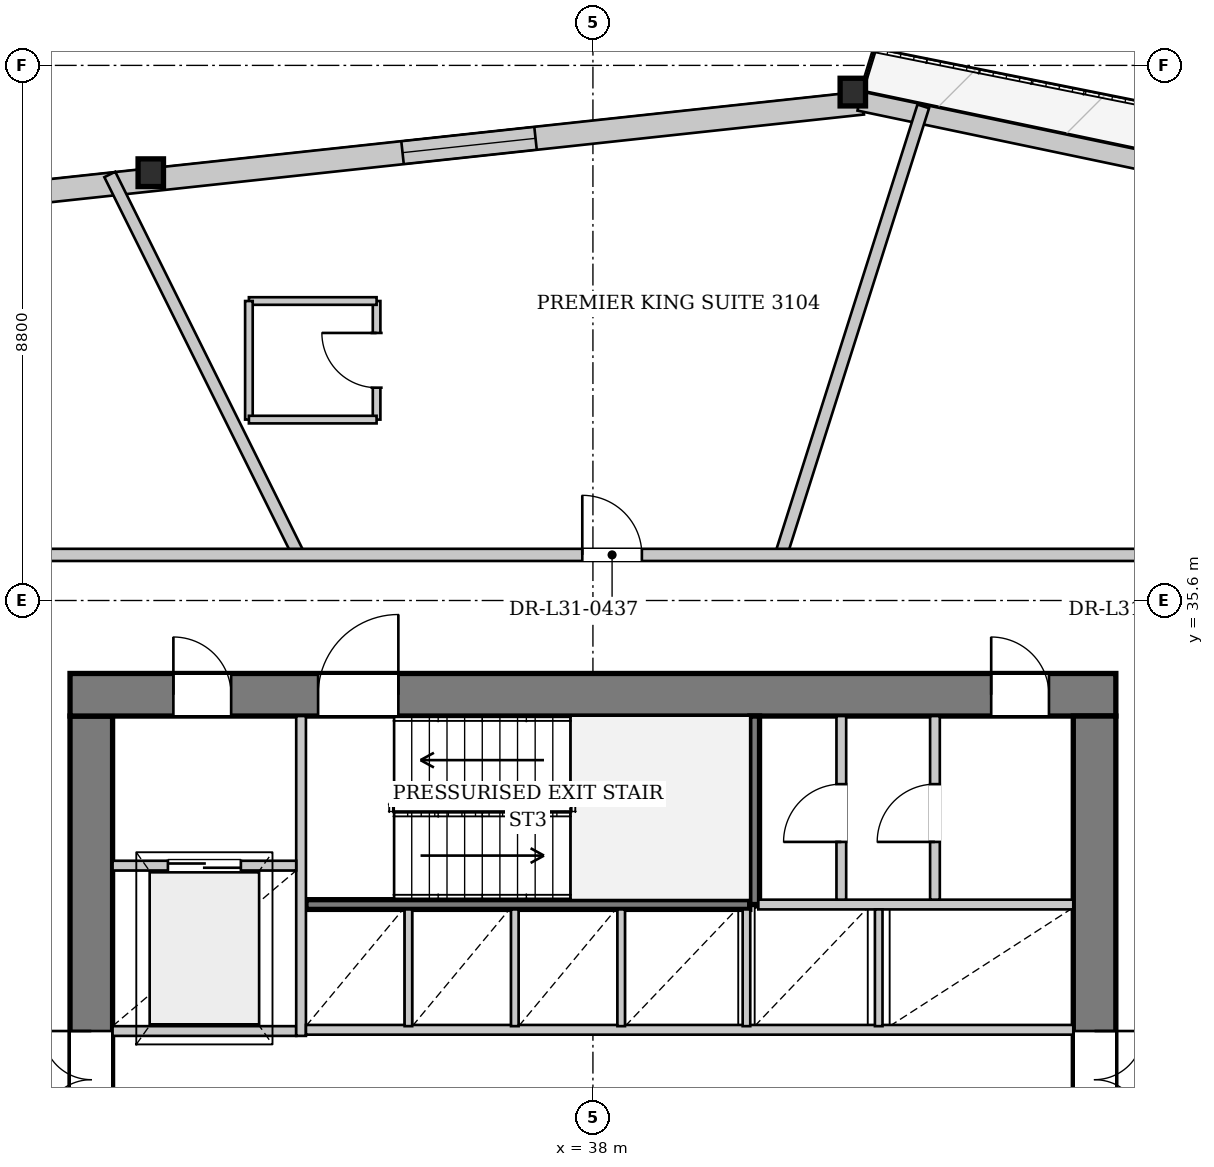
"""IFC4 building model, lengths in metres.
Left out: names, types, materials, properties, quantities, classifications, styles, units other than length and angle.
Written with IfcOpenShell. Run it as: python <this file> out.ifc"""

import sys

from ifc_helpers import new_model, si_unit, direction, frame, frame_2d, origin, origin_2d, place, context, subcontext, project, spatial, rectangle, i_section, extrude, source, transform, mapped, element, fill, save


model = new_model("IFC4")
c1 = context("Model", 3, precision=1e-05, world=origin(), true_north=direction((0.0, 1.0)))
c2 = subcontext(c1, "Body", "Model", "MODEL_VIEW")
j1 = project(units=[si_unit("LENGTHUNIT", "METRE"), si_unit("PLANEANGLEUNIT", "RADIAN")], contexts=[c1])
p1 = place(None, origin())
s1 = spatial("IfcSite", under=j1, at=p1, CompositionType="ELEMENT")
p2 = place(p1, origin())
s2 = spatial("IfcBuilding", under=s1, at=p2, CompositionType="ELEMENT")
p3 = place(p2, frame((0.0, 0.0, 119.9)))
s3 = spatial("IfcBuildingStorey", under=s2, at=p3, CompositionType="ELEMENT", Elevation=119.9)
m1 = source(origin(), c2, "Body", "SweptSolid", [
    extrude(i_section(OverallWidth=0.418, OverallDepth=0.455, WebThickness=0.038, FlangeThickness=0.059, at=origin_2d()), origin(), (0.0, 0.0, 1.0), 3.397),
])
p4 = place(p3, frame((42.417, 43.97, 0.0), z_axis=(-0.08401367615, -0.00546196697, 0.996449632012), x_axis=(0.064875871655, -0.997893341634, 0.0)))
e1 = element("IfcColumn", 1, at=p4, inside=s3, PredefinedType="COLUMN", context=c2, shape_type="MappedRepresentation", body=[
    mapped(m1, transform((0.0, 0.0, 0.0), x_axis=(1.0, 0.0, 0.0), y_axis=(0.0, 1.0, 0.0), z_axis=(0.0, 0.0, 1.0), scale=1.0)),
])
m2 = source(origin(), c2, "Body", "SweptSolid", [
    extrude(i_section(OverallWidth=0.418, OverallDepth=0.455, WebThickness=0.038, FlangeThickness=0.059, at=origin_2d()), origin(), (0.0, 0.0, 1.0), 3.399),
])
p5 = place(p3, frame((30.854, 42.723, 0.0), z_axis=(-0.074056478472, -0.051573764833, 0.995919567424), x_axis=(0.571484182627, -0.820613081182, 0.0)))
e2 = element("IfcColumn", 2, at=p5, inside=s3, PredefinedType="COLUMN", context=c2, shape_type="MappedRepresentation", body=[
    mapped(m2, transform((0.0, 0.0, 0.0), x_axis=(1.0, 0.0, 0.0), y_axis=(0.0, 1.0, 0.0), z_axis=(0.0, 0.0, 1.0), scale=1.0)),
])
p6 = place(p3, frame((19.312, 41.287, 0.0), z_axis=(0.0, 0.0, 1.0), x_axis=(0.994233058372, 0.107240969969, 0.0)))
e3 = element("IfcWall", 3, at=p6, inside=s3, PredefinedType="SOLIDWALL", context=c2, shape_type="SweptSolid", body=[
    extrude(rectangle(XDim=23.26, YDim=0.38, at=frame_2d((11.63, 0.0))), origin(), (0.0, 0.0, 1.0), 2.692),
])
p7 = place(p6, frame((5.413, 0.0, 0.322)))
e4 = element("IfcOpeningElement", 4, at=p7, cuts=e3, PredefinedType="OPENING", context=c2, shape_type="SweptSolid", body=[
    extrude(rectangle(XDim=2.2, YDim=2.25, at=frame_2d((1.1, 1.125))), frame((0.0, 0.2, 0.0), z_axis=(0.0, -1.0, 0.0), x_axis=(1.0, 0.0, 0.0)), (0.0, 0.0, 1.0), 0.4),
])
p8 = place(p6, frame((15.647, 0.0, 0.322)))
e5 = element("IfcOpeningElement", 5, at=p8, cuts=e3, PredefinedType="OPENING", context=c2, shape_type="SweptSolid", body=[
    extrude(rectangle(XDim=2.2, YDim=2.25, at=frame_2d((1.1, 1.125))), frame((0.0, 0.2, 0.0), z_axis=(0.0, -1.0, 0.0), x_axis=(1.0, 0.0, 0.0)), (0.0, 0.0, 1.0), 0.4),
])
p9 = place(p3, frame((42.384, 43.813, 0.0), z_axis=(0.0, 0.0, 1.0), x_axis=(0.978690657653, -0.205340197291, 0.0)))
e6 = element("IfcWall", 6, at=p9, inside=s3, PredefinedType="SOLIDWALL", context=c2, shape_type="SweptSolid", body=[
    extrude(rectangle(XDim=23.26, YDim=0.32, at=frame_2d((11.63, 0.0))), origin(), (0.0, 0.0, 1.0), 2.692),
])
p10 = place(p9, frame((6.893, 0.0, 0.0)))
e7 = element("IfcOpeningElement", 7, at=p10, cuts=e6, PredefinedType="OPENING", context=c2, shape_type="SweptSolid", body=[
    extrude(rectangle(XDim=1.1, YDim=2.3, at=frame_2d((0.55, 1.15))), frame((0.0, 0.17, 0.0), z_axis=(0.0, -1.0, 0.0), x_axis=(1.0, 0.0, 0.0)), (0.0, 0.0, 1.0), 0.34),
])
p11 = place(p9, frame((16.312, 0.0, 0.372)))
e8 = element("IfcOpeningElement", 8, at=p11, cuts=e6, PredefinedType="OPENING", context=c2, shape_type="SweptSolid", body=[
    extrude(rectangle(XDim=1.8, YDim=2.2, at=frame_2d((0.9, 1.1))), frame((0.0, 0.17, 0.0), z_axis=(0.0, -1.0, 0.0), x_axis=(1.0, 0.0, 0.0)), (0.0, 0.0, 1.0), 0.34),
])
p12 = place(p3, frame((29.75, 19.5, 0.0), z_axis=(0.0, 0.0, 1.0), x_axis=(0.0, 1.0, 0.0)))
e9 = element("IfcWall", 9, at=p12, inside=s3, PredefinedType="SHEAR", context=c2, shape_type="SweptSolid", body=[
    extrude(rectangle(XDim=14.2, YDim=0.7, at=frame_2d((7.1, 0.0))), origin(), (0.0, 0.0, 1.0), 3.3),
])
p13 = place(p12, frame((7.42, 0.0, 0.0)))
e10 = element("IfcOpeningElement", 10, at=p13, cuts=e9, PredefinedType="OPENING", context=c2, shape_type="SweptSolid", body=[
    extrude(rectangle(XDim=1.6, YDim=2.2, at=frame_2d((0.8, 1.1))), frame((0.0, 0.36, 0.0), z_axis=(0.0, -1.0, 0.0), x_axis=(1.0, 0.0, 0.0)), (0.0, 0.0, 1.0), 0.72),
])
p14 = place(p3, frame((29.4, 34.05, 0.0), z_axis=(0.0, 0.0, 1.0), x_axis=(1.0, 0.0, 0.0)))
e11 = element("IfcWall", 11, at=p14, inside=s3, PredefinedType="SHEAR", context=c2, shape_type="SweptSolid", body=[
    extrude(rectangle(XDim=17.2, YDim=0.7, at=frame_2d((8.6, 0.0))), origin(), (0.0, 0.0, 1.0), 3.3),
])
p15 = place(p14, frame((1.7, 0.0, 0.0)))
e12 = element("IfcOpeningElement", 12, at=p15, cuts=e11, PredefinedType="OPENING", context=c2, shape_type="SweptSolid", body=[
    extrude(rectangle(XDim=0.95, YDim=2.1, at=frame_2d((0.475, 1.05))), frame((0.0, 0.36, 0.0), z_axis=(0.0, -1.0, 0.0), x_axis=(1.0, 0.0, 0.0)), (0.0, 0.0, 1.0), 0.72),
])
p16 = place(p14, frame((4.08, 0.0, 0.0)))
e13 = element("IfcOpeningElement", 13, at=p16, cuts=e11, PredefinedType="OPENING", context=c2, shape_type="SweptSolid", body=[
    extrude(rectangle(XDim=1.32, YDim=2.2, at=frame_2d((0.66, 1.1))), frame((0.0, 0.36, 0.0), z_axis=(0.0, -1.0, 0.0), x_axis=(1.0, 0.0, 0.0)), (0.0, 0.0, 1.0), 0.72),
])
p17 = place(p14, frame((15.15, 0.0, 0.0)))
e14 = element("IfcOpeningElement", 14, at=p17, cuts=e11, PredefinedType="OPENING", context=c2, shape_type="SweptSolid", body=[
    extrude(rectangle(XDim=0.95, YDim=2.1, at=frame_2d((0.475, 1.05))), frame((0.0, 0.36, 0.0), z_axis=(0.0, -1.0, 0.0), x_axis=(1.0, 0.0, 0.0)), (0.0, 0.0, 1.0), 0.72),
])
p18 = place(p3, frame((46.25, 33.7, 0.0), z_axis=(0.0, 0.0, 1.0), x_axis=(0.0, -1.0, 0.0)))
e15 = element("IfcWall", 15, at=p18, inside=s3, PredefinedType="SHEAR", context=c2, shape_type="SweptSolid", body=[
    extrude(rectangle(XDim=14.2, YDim=0.7, at=frame_2d((7.1, 0.0))), origin(), (0.0, 0.0, 1.0), 3.3),
])
p19 = place(p18, frame((5.18, 0.0, 0.0)))
e16 = element("IfcOpeningElement", 16, at=p19, cuts=e15, PredefinedType="OPENING", context=c2, shape_type="SweptSolid", body=[
    extrude(rectangle(XDim=1.6, YDim=2.2, at=frame_2d((0.8, 1.1))), frame((0.0, 0.36, 0.0), z_axis=(0.0, -1.0, 0.0), x_axis=(1.0, 0.0, 0.0)), (0.0, 0.0, 1.0), 0.72),
])
p20 = place(p3, frame((33.28, 30.6, 0.0), z_axis=(0.0, 0.0, 1.0), x_axis=(1.0, 0.0, 0.0)))
e17 = element("IfcWall", 17, at=p20, inside=s3, PredefinedType="PARTITIONING", context=c2, shape_type="SweptSolid", body=[
    extrude(rectangle(XDim=7.3, YDim=0.16, at=frame_2d((3.65, 0.0))), origin(), (0.0, 0.0, 1.0), 3.3),
])
p21 = place(p3, frame((40.66, 30.6, 0.0), z_axis=(0.0, 0.0, 1.0), x_axis=(0.0, 1.0, 0.0)))
e18 = element("IfcWall", 18, at=p21, inside=s3, PredefinedType="PARTITIONING", context=c2, shape_type="SweptSolid", body=[
    extrude(rectangle(XDim=3.1, YDim=0.16, at=frame_2d((1.55, 0.0))), origin(), (0.0, 0.0, 1.0), 3.3),
])
p22 = place(p3, frame((30.1, 28.52, 0.0), z_axis=(0.0, 0.0, 1.0), x_axis=(1.0, 0.0, 0.0)))
e19 = element("IfcWall", 19, at=p22, inside=s3, PredefinedType="PARTITIONING", context=c2, shape_type="SweptSolid", body=[
    extrude(rectangle(XDim=3.02, YDim=0.16, at=frame_2d((1.51, 0.0))), origin(), (0.0, 0.0, 1.0), 3.3),
])
p23 = place(p3, frame((33.2, 28.44, 0.0), z_axis=(0.0, 0.0, 1.0), x_axis=(0.0, 1.0, 0.0)))
e20 = element("IfcWall", 20, at=p23, inside=s3, PredefinedType="PARTITIONING", context=c2, shape_type="SweptSolid", body=[
    extrude(rectangle(XDim=5.26, YDim=0.16, at=frame_2d((2.63, 0.0))), origin(), (0.0, 0.0, 1.0), 3.3),
])
p24 = place(p3, frame((30.1, 31.24, 0.0), z_axis=(0.0, 0.0, 1.0), x_axis=(1.0, 0.0, 0.0)))
e21 = element("IfcWall", 21, at=p24, inside=s3, PredefinedType="PARTITIONING", context=c2, shape_type="SweptSolid", body=[
    extrude(rectangle(XDim=3.02, YDim=0.16, at=frame_2d((1.51, 0.0))), origin(), (0.0, 0.0, 1.0), 3.3),
])
p25 = place(p24, frame((0.91, 0.0, 0.0)))
e22 = element("IfcOpeningElement", 22, at=p25, cuts=e21, PredefinedType="OPENING", context=c2, shape_type="SweptSolid", body=[
    extrude(rectangle(XDim=1.2, YDim=2.2, at=frame_2d((0.6, 1.1))), frame((0.0, 0.09, 0.0), z_axis=(0.0, -1.0, 0.0), x_axis=(1.0, 0.0, 0.0)), (0.0, 0.0, 1.0), 0.18),
])
p26 = place(p3, frame((33.28, 28.54, 0.0), z_axis=(0.0, 0.0, 1.0), x_axis=(1.0, 0.0, 0.0)))
e23 = element("IfcWall", 23, at=p26, inside=s3, PredefinedType="PARTITIONING", context=c2, shape_type="SweptSolid", body=[
    extrude(rectangle(XDim=12.62, YDim=0.16, at=frame_2d((6.31, 0.0))), origin(), (0.0, 0.0, 1.0), 3.3),
])
p27 = place(p3, frame((40.72, 30.6, 0.0), z_axis=(0.0, 0.0, 1.0), x_axis=(1.0, 0.0, 0.0)))
e24 = element("IfcWall", 24, at=p27, inside=s3, PredefinedType="PARTITIONING", context=c2, shape_type="SweptSolid", body=[
    extrude(rectangle(XDim=5.18, YDim=0.16, at=frame_2d((2.59, 0.0))), origin(), (0.0, 0.0, 1.0), 3.3),
])
for number, where, z_axis, x_axis in (
    (25, (34.965, 28.6, 0.0), (0.0, 0.0, 1.0), (0.0, 1.0, 0.0)),
    (26, (36.715, 28.6, 0.0), (0.0, 0.0, 1.0), (0.0, 1.0, 0.0)),
    (27, (38.465, 28.6, 0.0), (0.0, 0.0, 1.0), (0.0, 1.0, 0.0)),
    (28, (40.525, 28.6, 0.0), (0.0, 0.0, 1.0), (0.0, 1.0, 0.0)),
    (29, (42.7, 28.6, 0.0), (0.0, 0.0, 1.0), (0.0, 1.0, 0.0)),
):
    element("IfcWall", number, at=place(p3, frame(where, z_axis=z_axis, x_axis=x_axis)), inside=s3, PredefinedType="PARTITIONING", context=c2, shape_type="SweptSolid", body=[
        extrude(rectangle(XDim=1.92, YDim=0.125, at=frame_2d((0.96, 0.0))), origin(), (0.0, 0.0, 1.0), 3.3),
    ])
p28 = place(p3, frame((42.085, 30.68, 0.0), z_axis=(0.0, 0.0, 1.0), x_axis=(0.0, 1.0, 0.0)))
e30 = element("IfcWall", 30, at=p28, inside=s3, PredefinedType="PARTITIONING", context=c2, shape_type="SweptSolid", body=[
    extrude(rectangle(XDim=3.02, YDim=0.16, at=frame_2d((1.51, 0.0))), origin(), (0.0, 0.0, 1.0), 3.3),
])
p29 = place(p28, frame((0.95, 0.0, 0.0)))
e31 = element("IfcOpeningElement", 31, at=p29, cuts=e30, PredefinedType="OPENING", context=c2, shape_type="SweptSolid", body=[
    extrude(rectangle(XDim=0.95, YDim=2.1, at=frame_2d((0.475, 1.05))), frame((0.0, 0.09, 0.0), z_axis=(0.0, -1.0, 0.0), x_axis=(1.0, 0.0, 0.0)), (0.0, 0.0, 1.0), 0.18),
])
p30 = place(p3, frame((43.625, 30.68, 0.0), z_axis=(0.0, 0.0, 1.0), x_axis=(0.0, 1.0, 0.0)))
e32 = element("IfcWall", 32, at=p30, inside=s3, PredefinedType="PARTITIONING", context=c2, shape_type="SweptSolid", body=[
    extrude(rectangle(XDim=3.02, YDim=0.16, at=frame_2d((1.51, 0.0))), origin(), (0.0, 0.0, 1.0), 3.3),
])
p31 = place(p30, frame((0.95, 0.0, 0.0)))
e33 = element("IfcOpeningElement", 33, at=p31, cuts=e32, PredefinedType="OPENING", context=c2, shape_type="SweptSolid", body=[
    extrude(rectangle(XDim=0.95, YDim=2.1, at=frame_2d((0.475, 1.05))), frame((0.0, 0.09, 0.0), z_axis=(0.0, -1.0, 0.0), x_axis=(1.0, 0.0, 0.0)), (0.0, 0.0, 1.0), 0.18),
])
p32 = place(p3, frame((41.093, 36.35, 0.0), z_axis=(0.0, 0.0, 1.0), x_axis=(0.302366217447, 0.953191833026, 0.0)))
e34 = element("IfcWall", 34, at=p32, inside=s3, PredefinedType="PARTITIONING", context=c2, shape_type="SweptSolid", body=[
    extrude(rectangle(XDim=7.739, YDim=0.2, at=frame_2d((3.869, 0.0))), origin(), (0.0, 0.0, 1.0), 3.3),
])
p33 = place(p3, frame((33.16, 36.35, 0.0), z_axis=(0.0, 0.0, 1.0), x_axis=(-0.444639192868, 0.895709767819, 0.0)))
e35 = element("IfcWall", 35, at=p33, inside=s3, PredefinedType="PARTITIONING", context=c2, shape_type="SweptSolid", body=[
    extrude(rectangle(XDim=6.985, YDim=0.2, at=frame_2d((3.492, 0.0))), origin(), (0.0, 0.0, 1.0), 3.3),
])
p34 = place(p3, frame((34.442, 38.575, 0.0), z_axis=(0.0, 0.0, 1.0), x_axis=(0.0, 1.0, 0.0)))
e36 = element("IfcWall", 36, at=p34, inside=s3, PredefinedType="PARTITIONING", context=c2, shape_type="SweptSolid", body=[
    extrude(rectangle(XDim=1.95, YDim=0.125, at=frame_2d((0.975, 0.0))), origin(), (0.0, 0.0, 1.0), 3.3),
])
p35 = place(p34, frame((0.525, 0.0, 0.0)))
e37 = element("IfcOpeningElement", 37, at=p35, cuts=e36, PredefinedType="OPENING", context=c2, shape_type="SweptSolid", body=[
    extrude(rectangle(XDim=0.9, YDim=2.1, at=frame_2d((0.45, 1.05))), frame((0.0, 0.073, 0.0), z_axis=(0.0, -1.0, 0.0), x_axis=(1.0, 0.0, 0.0)), (0.0, 0.0, 1.0), 0.145),
])
p36 = place(p3, frame((34.442, 40.525, 0.0), z_axis=(0.0, 0.0, 1.0), x_axis=(-1.0, 0.0, 0.0)))
e38 = element("IfcWall", 38, at=p36, inside=s3, PredefinedType="PARTITIONING", context=c2, shape_type="SweptSolid", body=[
    extrude(rectangle(XDim=2.1, YDim=0.125, at=frame_2d((1.05, 0.0))), origin(), (0.0, 0.0, 1.0), 3.3),
])
p37 = place(p3, frame((32.342, 40.525, 0.0), z_axis=(0.0, 0.0, 1.0), x_axis=(0.0, -1.0, 0.0)))
e39 = element("IfcWall", 39, at=p37, inside=s3, PredefinedType="PARTITIONING", context=c2, shape_type="SweptSolid", body=[
    extrude(rectangle(XDim=1.95, YDim=0.125, at=frame_2d((0.975, 0.0))), origin(), (0.0, 0.0, 1.0), 3.3),
])
p38 = place(p3, frame((32.342, 38.575, 0.0), z_axis=(0.0, 0.0, 1.0), x_axis=(1.0, 0.0, 0.0)))
e40 = element("IfcWall", 40, at=p38, inside=s3, PredefinedType="PARTITIONING", context=c2, shape_type="SweptSolid", body=[
    extrude(rectangle(XDim=2.1, YDim=0.125, at=frame_2d((1.05, 0.0))), origin(), (0.0, 0.0, 1.0), 3.3),
])
p39 = place(p3, frame((27.45, 36.35, 0.0), z_axis=(0.0, 0.0, 1.0), x_axis=(1.0, 0.0, 0.0)))
e41 = element("IfcWall", 41, at=p39, inside=s3, PredefinedType="PARTITIONING", context=c2, shape_type="SweptSolid", body=[
    extrude(rectangle(XDim=21.1, YDim=0.2, at=frame_2d((10.55, 0.0))), origin(), (0.0, 0.0, 1.0), 3.3),
])
p40 = place(p39, frame((19.579, 0.0, 0.0)))
e42 = element("IfcOpeningElement", 42, at=p40, cuts=e41, PredefinedType="OPENING", context=c2, shape_type="SweptSolid", body=[
    extrude(rectangle(XDim=0.98, YDim=2.15, at=frame_2d((0.49, 1.075))), frame((0.0, 0.11, 0.0), z_axis=(0.0, -1.0, 0.0), x_axis=(1.0, 0.0, 0.0)), (0.0, 0.0, 1.0), 0.22),
])
p41 = place(p39, frame((10.375, 0.0, 0.0)))
e43 = element("IfcOpeningElement", 43, at=p41, cuts=e41, PredefinedType="OPENING", context=c2, shape_type="SweptSolid", body=[
    extrude(rectangle(XDim=0.98, YDim=2.15, at=frame_2d((0.49, 1.075))), frame((0.0, 0.11, 0.0), z_axis=(0.0, -1.0, 0.0), x_axis=(1.0, 0.0, 0.0)), (0.0, 0.0, 1.0), 0.22),
])
m3 = source(origin(), c2, "Body", "SweptSolid", [
    extrude(rectangle(XDim=2.2, YDim=2.25, at=frame_2d((1.1, 1.125))), frame((0.0, 0.03, 0.0), z_axis=(0.0, -1.0, 0.0), x_axis=(1.0, 0.0, 0.0)), (0.0, 0.0, 1.0), 0.06),
])
p42 = place(p8, origin())
e44 = element("IfcWindow", 44, at=p42, inside=s3, PartitioningType="SINGLE_PANEL", PredefinedType="WINDOW", context=c2, shape_type="MappedRepresentation", body=[
    mapped(m3, transform((0.0, 0.0, 0.0), x_axis=(1.0, 0.0, 0.0), y_axis=(0.0, 1.0, 0.0), z_axis=(0.0, 0.0, 1.0), scale=1.0)),
])
fill(e5, e44)
m4 = source(origin(), c2, "Body", "SweptSolid", [
    extrude(rectangle(XDim=1.6, YDim=2.2, at=frame_2d((0.8, 1.1))), frame((0.0, 0.025, 0.0), z_axis=(0.0, -1.0, 0.0), x_axis=(1.0, 0.0, 0.0)), (0.0, 0.0, 1.0), 0.05),
])
p43 = place(p13, origin())
e45 = element("IfcDoor", 45, at=p43, inside=s3, OperationType="DOUBLE_DOOR_SINGLE_SWING", PredefinedType="DOOR", context=c2, shape_type="MappedRepresentation", body=[
    mapped(m4, transform((0.0, 0.0, 0.0), x_axis=(1.0, 0.0, 0.0), y_axis=(0.0, 1.0, 0.0), z_axis=(0.0, 0.0, 1.0), scale=1.0)),
])
fill(e10, e45)
m5 = source(origin(), c2, "Body", "SweptSolid", [
    extrude(rectangle(XDim=0.95, YDim=2.1, at=frame_2d((0.475, 1.05))), frame((0.0, 0.025, 0.0), z_axis=(0.0, -1.0, 0.0), x_axis=(1.0, 0.0, 0.0)), (0.0, 0.0, 1.0), 0.05),
])
p44 = place(p15, origin())
e46 = element("IfcDoor", 46, at=p44, inside=s3, OperationType="SINGLE_SWING_LEFT", PredefinedType="DOOR", context=c2, shape_type="MappedRepresentation", body=[
    mapped(m5, transform((0.0, 0.0, 0.0), x_axis=(1.0, 0.0, 0.0), y_axis=(0.0, 1.0, 0.0), z_axis=(0.0, 0.0, 1.0), scale=1.0)),
])
fill(e12, e46)
m6 = source(origin(), c2, "Body", "SweptSolid", [
    extrude(rectangle(XDim=1.32, YDim=2.2, at=frame_2d((0.66, 1.1))), frame((0.0, 0.025, 0.0), z_axis=(0.0, -1.0, 0.0), x_axis=(1.0, 0.0, 0.0)), (0.0, 0.0, 1.0), 0.05),
])
p45 = place(p16, origin())
e47 = element("IfcDoor", 47, at=p45, inside=s3, OperationType="SINGLE_SWING_RIGHT", PredefinedType="DOOR", context=c2, shape_type="MappedRepresentation", body=[
    mapped(m6, transform((0.0, 0.0, 0.0), x_axis=(1.0, 0.0, 0.0), y_axis=(0.0, 1.0, 0.0), z_axis=(0.0, 0.0, 1.0), scale=1.0)),
])
fill(e13, e47)
p46 = place(p19, origin())
e48 = element("IfcDoor", 48, at=p46, inside=s3, OperationType="DOUBLE_DOOR_SINGLE_SWING", PredefinedType="DOOR", context=c2, shape_type="MappedRepresentation", body=[
    mapped(m4, transform((0.0, 0.0, 0.0), x_axis=(1.0, 0.0, 0.0), y_axis=(0.0, 1.0, 0.0), z_axis=(0.0, 0.0, 1.0), scale=1.0)),
])
fill(e16, e48)
m7 = source(origin(), c2, "Body", "SweptSolid", [
    extrude(rectangle(XDim=1.2, YDim=2.2, at=frame_2d((0.6, 1.1))), frame((0.0, 0.025, 0.0), z_axis=(0.0, -1.0, 0.0), x_axis=(1.0, 0.0, 0.0)), (0.0, 0.0, 1.0), 0.05),
])
p47 = place(p25, origin())
e49 = element("IfcDoor", 49, at=p47, inside=s3, OperationType="DOUBLE_DOOR_SLIDING", PredefinedType="DOOR", context=c2, shape_type="MappedRepresentation", body=[
    mapped(m7, transform((0.0, 0.0, 0.0), x_axis=(1.0, 0.0, 0.0), y_axis=(0.0, 1.0, 0.0), z_axis=(0.0, 0.0, 1.0), scale=1.0)),
])
fill(e22, e49)
p48 = place(p29, origin())
e50 = element("IfcDoor", 50, at=p48, inside=s3, OperationType="SINGLE_SWING_LEFT", PredefinedType="DOOR", context=c2, shape_type="MappedRepresentation", body=[
    mapped(m5, transform((0.0, 0.0, 0.0), x_axis=(1.0, 0.0, 0.0), y_axis=(0.0, 1.0, 0.0), z_axis=(0.0, 0.0, 1.0), scale=1.0)),
])
fill(e31, e50)
p49 = place(p31, origin())
e51 = element("IfcDoor", 51, at=p49, inside=s3, OperationType="SINGLE_SWING_LEFT", PredefinedType="DOOR", context=c2, shape_type="MappedRepresentation", body=[
    mapped(m5, transform((0.0, 0.0, 0.0), x_axis=(1.0, 0.0, 0.0), y_axis=(0.0, 1.0, 0.0), z_axis=(0.0, 0.0, 1.0), scale=1.0)),
])
fill(e33, e51)
p50 = place(p17, origin())
e52 = element("IfcDoor", 52, at=p50, inside=s3, OperationType="SINGLE_SWING_LEFT", PredefinedType="DOOR", context=c2, shape_type="MappedRepresentation", body=[
    mapped(m5, transform((0.0, 0.0, 0.0), x_axis=(1.0, 0.0, 0.0), y_axis=(0.0, 1.0, 0.0), z_axis=(0.0, 0.0, 1.0), scale=1.0)),
])
fill(e14, e52)
m8 = source(origin(), c2, "Body", "SweptSolid", [
    extrude(rectangle(XDim=0.9, YDim=2.1, at=frame_2d((0.45, 1.05))), frame((0.0, 0.025, 0.0), z_axis=(0.0, -1.0, 0.0), x_axis=(1.0, 0.0, 0.0)), (0.0, 0.0, 1.0), 0.05),
])
p51 = place(p35, origin())
e53 = element("IfcDoor", 53, at=p51, inside=s3, OperationType="SINGLE_SWING_RIGHT", PredefinedType="DOOR", context=c2, shape_type="MappedRepresentation", body=[
    mapped(m8, transform((0.0, 0.0, 0.0), x_axis=(1.0, 0.0, 0.0), y_axis=(0.0, 1.0, 0.0), z_axis=(0.0, 0.0, 1.0), scale=1.0)),
])
fill(e37, e53)
m9 = source(origin(), c2, "Body", "SweptSolid", [
    extrude(rectangle(XDim=0.98, YDim=2.15, at=frame_2d((0.49, 1.075))), frame((0.0, 0.025, 0.0), z_axis=(0.0, -1.0, 0.0), x_axis=(1.0, 0.0, 0.0)), (0.0, 0.0, 1.0), 0.05),
])
p52 = place(p41, origin())
e54 = element("IfcDoor", 54, at=p52, inside=s3, OperationType="SINGLE_SWING_LEFT", PredefinedType="DOOR", context=c2, shape_type="MappedRepresentation", body=[
    mapped(m9, transform((0.0, 0.0, 0.0), x_axis=(1.0, 0.0, 0.0), y_axis=(0.0, 1.0, 0.0), z_axis=(0.0, 0.0, 1.0), scale=1.0)),
])
fill(e43, e54)
save(model, sys.argv[1])
